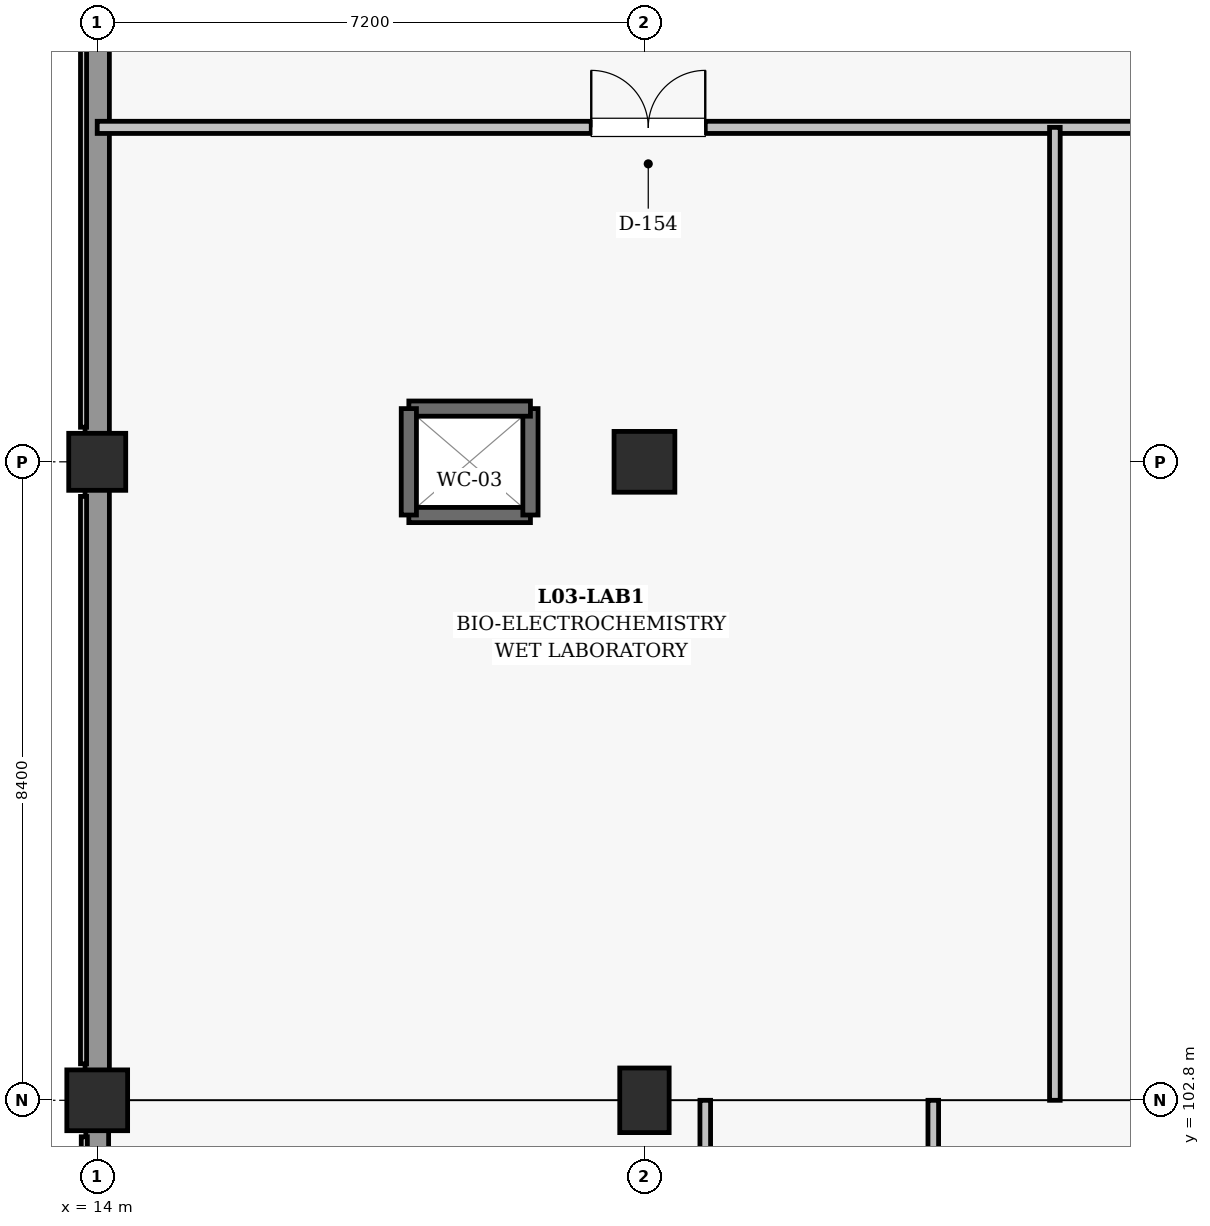
"""IFC4 building model, lengths in metres.
Left out: names, types, materials, properties, quantities, classifications, styles, units other than length and angle.
Written with IfcOpenShell. Run it as: python <this file> out.ifc"""

import sys

from ifc_helpers import new_model, si_unit, direction, frame, frame_2d, origin, origin_2d, place, context, subcontext, project, spatial, rectangle, extrude, element, fill, save


model = new_model("IFC4")
c1 = context("Model", 3, precision=1e-05, world=origin(), true_north=direction((0.0, 1.0)))
c2 = subcontext(c1, "Body", "Model", "MODEL_VIEW")
j1 = project(units=[si_unit("LENGTHUNIT", "METRE"), si_unit("PLANEANGLEUNIT", "RADIAN")], contexts=[c1])
p1 = place(None, origin())
s1 = spatial("IfcSite", under=j1, at=p1, CompositionType="ELEMENT")
p2 = place(p1, origin())
s2 = spatial("IfcBuilding", under=s1, at=p2, CompositionType="ELEMENT")
p3 = place(p2, frame((0.0, 0.0, 14.4)))
s3 = spatial("IfcBuildingStorey", under=s2, at=p3, CompositionType="ELEMENT", Elevation=14.4)
p4 = place(p3, frame((14.0, 102.8, 0.0), z_axis=(0.0, 0.0, 1.0), x_axis=(1.0, 0.0, 0.0)))
e1 = element("IfcColumn", 1, at=p4, inside=s3, PredefinedType="COLUMN", context=c2, shape_type="SweptSolid", body=[
    extrude(rectangle(XDim=0.8, YDim=0.8, at=origin_2d()), origin(), (0.0, 0.0, 1.0), 4.5),
])
p5 = place(p3, frame((14.0, 111.2, 0.0), z_axis=(0.0, 0.0, 1.0), x_axis=(1.0, 0.0, 0.0)))
e2 = element("IfcColumn", 2, at=p5, inside=s3, PredefinedType="COLUMN", context=c2, shape_type="SweptSolid", body=[
    extrude(rectangle(XDim=0.75, YDim=0.75, at=origin_2d()), origin(), (0.0, 0.0, 1.0), 4.5),
])
p6 = place(p3, frame((21.2, 102.8, 0.0), z_axis=(0.0, 0.0, 1.0), x_axis=(1.0, 0.0, 0.0)))
e3 = element("IfcColumn", 3, at=p6, inside=s3, PredefinedType="COLUMN", context=c2, shape_type="SweptSolid", body=[
    extrude(rectangle(XDim=0.65, YDim=0.85, at=origin_2d()), origin(), (0.0, 0.0, 1.0), 4.5),
])
p7 = place(p3, frame((21.2, 111.2, 0.0), z_axis=(0.0, 0.0, 1.0), x_axis=(1.0, 0.0, 0.0)))
e4 = element("IfcColumn", 4, at=p7, inside=s3, PredefinedType="COLUMN", context=c2, shape_type="SweptSolid", body=[
    extrude(rectangle(XDim=0.8, YDim=0.8, at=origin_2d()), origin(), (0.0, 0.0, 1.0), 4.5),
])
p8 = place(p3, frame((14.0, 103.18, 0.0), z_axis=(0.0, 0.0, 1.0), x_axis=(0.0, 1.0, 0.0)))
e5 = element("IfcWall", 5, at=p8, inside=s3, PredefinedType="SOLIDWALL", context=c2, shape_type="SweptSolid", body=[
    extrude(rectangle(XDim=7.665, YDim=0.32, at=frame_2d((3.833, 0.0))), origin(), (0.0, 0.0, 1.0), 3.355),
])
p9 = place(p3, frame((14.0, 111.555, 0.0), z_axis=(0.0, 0.0, 1.0), x_axis=(0.0, 1.0, 0.0)))
e6 = element("IfcWall", 6, at=p9, inside=s3, PredefinedType="SOLIDWALL", context=c2, shape_type="SweptSolid", body=[
    extrude(rectangle(XDim=7.69, YDim=0.32, at=frame_2d((3.845, 0.0))), origin(), (0.0, 0.0, 1.0), 3.405),
])
p10 = place(p3, frame((14.0, 94.73, 0.0), z_axis=(0.0, 0.0, 1.0), x_axis=(0.0, 1.0, 0.0)))
e7 = element("IfcWall", 7, at=p10, inside=s3, PredefinedType="SOLIDWALL", context=c2, shape_type="SweptSolid", body=[
    extrude(rectangle(XDim=7.69, YDim=0.3, at=frame_2d((3.845, 0.0))), origin(), (0.0, 0.0, 1.0), 3.355),
])
p11 = place(p3, frame((18.1, 110.5, 0.0), z_axis=(0.0, 0.0, 1.0), x_axis=(1.0, 0.0, 0.0)))
e8 = element("IfcWall", 8, at=p11, inside=s3, PredefinedType="SHEAR", context=c2, shape_type="SweptSolid", body=[
    extrude(rectangle(XDim=1.6, YDim=0.2, at=frame_2d((0.8, 0.0))), origin(), (0.0, 0.0, 1.0), 4.14),
])
p12 = place(p3, frame((19.7, 110.5, 0.0), z_axis=(0.0, 0.0, 1.0), x_axis=(0.0, 1.0, 0.0)))
e9 = element("IfcWall", 9, at=p12, inside=s3, PredefinedType="SHEAR", context=c2, shape_type="SweptSolid", body=[
    extrude(rectangle(XDim=1.4, YDim=0.2, at=frame_2d((0.7, 0.0))), origin(), (0.0, 0.0, 1.0), 4.14),
])
p13 = place(p3, frame((19.7, 111.9, 0.0), z_axis=(0.0, 0.0, 1.0), x_axis=(-1.0, 0.0, 0.0)))
e10 = element("IfcWall", 10, at=p13, inside=s3, PredefinedType="SHEAR", context=c2, shape_type="SweptSolid", body=[
    extrude(rectangle(XDim=1.6, YDim=0.2, at=frame_2d((0.8, 0.0))), origin(), (0.0, 0.0, 1.0), 4.14),
])
p14 = place(p3, frame((18.1, 111.9, 0.0), z_axis=(0.0, 0.0, 1.0), x_axis=(0.0, -1.0, 0.0)))
e11 = element("IfcWall", 11, at=p14, inside=s3, PredefinedType="SHEAR", context=c2, shape_type="SweptSolid", body=[
    extrude(rectangle(XDim=1.4, YDim=0.2, at=frame_2d((0.7, 0.0))), origin(), (0.0, 0.0, 1.0), 4.14),
])
p15 = place(p3, frame((14.0, 115.6, 0.0), z_axis=(0.0, 0.0, 1.0), x_axis=(1.0, 0.0, 0.0)))
e12 = element("IfcWall", 12, at=p15, inside=s3, PredefinedType="PARTITIONING", context=c2, shape_type="SweptSolid", body=[
    extrude(rectangle(XDim=100.8, YDim=0.16, at=frame_2d((50.4, 0.0))), origin(), (0.0, 0.0, 1.0), 2.96),
])
p16 = place(p15, frame((29.9, 0.0, 0.0)))
e13 = element("IfcOpeningElement", 13, at=p16, cuts=e12, PredefinedType="OPENING", context=c2, shape_type="SweptSolid", body=[
    extrude(rectangle(XDim=1.0, YDim=2.15, at=frame_2d((0.5, 1.075))), frame((0.0, 0.09, 0.0), z_axis=(0.0, -1.0, 0.0), x_axis=(1.0, 0.0, 0.0)), (0.0, 0.0, 1.0), 0.18),
])
p17 = place(p15, frame((6.5, 0.0, 0.0)))
e14 = element("IfcOpeningElement", 14, at=p17, cuts=e12, PredefinedType="OPENING", context=c2, shape_type="SweptSolid", body=[
    extrude(rectangle(XDim=1.5, YDim=2.25, at=frame_2d((0.75, 1.125))), frame((0.0, 0.09, 0.0), z_axis=(0.0, -1.0, 0.0), x_axis=(1.0, 0.0, 0.0)), (0.0, 0.0, 1.0), 0.18),
])
p18 = place(p15, frame((22.9, 0.0, 0.0)))
e15 = element("IfcOpeningElement", 15, at=p18, cuts=e12, PredefinedType="OPENING", context=c2, shape_type="SweptSolid", body=[
    extrude(rectangle(XDim=1.5, YDim=2.25, at=frame_2d((0.75, 1.125))), frame((0.0, 0.09, 0.0), z_axis=(0.0, -1.0, 0.0), x_axis=(1.0, 0.0, 0.0)), (0.0, 0.0, 1.0), 0.18),
])
p19 = place(p15, frame((39.4, 0.0, 0.0)))
e16 = element("IfcOpeningElement", 16, at=p19, cuts=e12, PredefinedType="OPENING", context=c2, shape_type="SweptSolid", body=[
    extrude(rectangle(XDim=1.5, YDim=2.25, at=frame_2d((0.75, 1.125))), frame((0.0, 0.09, 0.0), z_axis=(0.0, -1.0, 0.0), x_axis=(1.0, 0.0, 0.0)), (0.0, 0.0, 1.0), 0.18),
])
p20 = place(p15, frame((55.8, 0.0, 0.0)))
e17 = element("IfcOpeningElement", 17, at=p20, cuts=e12, PredefinedType="OPENING", context=c2, shape_type="SweptSolid", body=[
    extrude(rectangle(XDim=1.5, YDim=2.25, at=frame_2d((0.75, 1.125))), frame((0.0, 0.09, 0.0), z_axis=(0.0, -1.0, 0.0), x_axis=(1.0, 0.0, 0.0)), (0.0, 0.0, 1.0), 0.18),
])
p21 = place(p15, frame((74.9, 0.0, 0.0)))
e18 = element("IfcOpeningElement", 18, at=p21, cuts=e12, PredefinedType="OPENING", context=c2, shape_type="SweptSolid", body=[
    extrude(rectangle(XDim=1.5, YDim=2.25, at=frame_2d((0.75, 1.125))), frame((0.0, 0.09, 0.0), z_axis=(0.0, -1.0, 0.0), x_axis=(1.0, 0.0, 0.0)), (0.0, 0.0, 1.0), 0.18),
])
p22 = place(p15, frame((87.9, 0.0, 0.0)))
e19 = element("IfcOpeningElement", 19, at=p22, cuts=e12, PredefinedType="OPENING", context=c2, shape_type="SweptSolid", body=[
    extrude(rectangle(XDim=1.1, YDim=2.15, at=frame_2d((0.55, 1.075))), frame((0.0, 0.09, 0.0), z_axis=(0.0, -1.0, 0.0), x_axis=(1.0, 0.0, 0.0)), (0.0, 0.0, 1.0), 0.18),
])
p23 = place(p15, frame((91.45, 0.0, 0.0)))
e20 = element("IfcOpeningElement", 20, at=p23, cuts=e12, PredefinedType="OPENING", context=c2, shape_type="SweptSolid", body=[
    extrude(rectangle(XDim=1.18, YDim=2.2, at=frame_2d((0.59, 1.1))), frame((0.0, 0.09, 0.0), z_axis=(0.0, -1.0, 0.0), x_axis=(1.0, 0.0, 0.0)), (0.0, 0.0, 1.0), 0.18),
])
p24 = place(p3, frame((26.6, 102.8, 0.0), z_axis=(0.0, 0.0, 1.0), x_axis=(0.0, 1.0, 0.0)))
e21 = element("IfcWall", 21, at=p24, inside=s3, PredefinedType="PARTITIONING", context=c2, shape_type="SweptSolid", body=[
    extrude(rectangle(XDim=12.8, YDim=0.14, at=frame_2d((6.4, 0.0))), origin(), (0.0, 0.0, 1.0), 3.51),
])
p25 = place(p3, frame((25.0, 36.0, 0.0), z_axis=(0.0, 0.0, 1.0), x_axis=(0.0, 1.0, 0.0)))
e22 = element("IfcWall", 22, at=p25, inside=s3, PredefinedType="PARTITIONING", context=c2, shape_type="SweptSolid", body=[
    extrude(rectangle(XDim=66.8, YDim=0.14, at=frame_2d((33.4, 0.0))), origin(), (0.0, 0.0, 1.0), 3.38),
])
p26 = place(p25, frame((9.0, 0.0, 0.0)))
e23 = element("IfcOpeningElement", 23, at=p26, cuts=e22, PredefinedType="OPENING", context=c2, shape_type="SweptSolid", body=[
    extrude(rectangle(XDim=1.18, YDim=2.2, at=frame_2d((0.59, 1.1))), frame((0.0, 0.08, 0.0), z_axis=(0.0, -1.0, 0.0), x_axis=(1.0, 0.0, 0.0)), (0.0, 0.0, 1.0), 0.16),
])
p27 = place(p25, frame((30.4, 0.0, 0.0)))
e24 = element("IfcOpeningElement", 24, at=p27, cuts=e22, PredefinedType="OPENING", context=c2, shape_type="SweptSolid", body=[
    extrude(rectangle(XDim=1.25, YDim=2.2, at=frame_2d((0.625, 1.1))), frame((0.0, 0.08, 0.0), z_axis=(0.0, -1.0, 0.0), x_axis=(1.0, 0.0, 0.0)), (0.0, 0.0, 1.0), 0.16),
])
p28 = place(p25, frame((54.6, 0.0, 0.0)))
e25 = element("IfcOpeningElement", 25, at=p28, cuts=e22, PredefinedType="OPENING", context=c2, shape_type="SweptSolid", body=[
    extrude(rectangle(XDim=1.35, YDim=2.2, at=frame_2d((0.675, 1.1))), frame((0.0, 0.08, 0.0), z_axis=(0.0, -1.0, 0.0), x_axis=(1.0, 0.0, 0.0)), (0.0, 0.0, 1.0), 0.16),
])
p29 = place(p3, frame((22.0, 63.2, 0.0), z_axis=(0.0, 0.0, 1.0), x_axis=(0.0, 1.0, 0.0)))
e26 = element("IfcWall", 26, at=p29, inside=s3, PredefinedType="PARTITIONING", context=c2, shape_type="SweptSolid", body=[
    extrude(rectangle(XDim=39.6, YDim=0.14, at=frame_2d((19.8, 0.0))), origin(), (0.0, 0.0, 1.0), 3.38),
])
p30 = place(p29, frame((11.3, 0.0, 0.0)))
e27 = element("IfcOpeningElement", 27, at=p30, cuts=e26, PredefinedType="OPENING", context=c2, shape_type="SweptSolid", body=[
    extrude(rectangle(XDim=1.25, YDim=2.2, at=frame_2d((0.625, 1.1))), frame((0.0, 0.08, 0.0), z_axis=(0.0, -1.0, 0.0), x_axis=(1.0, 0.0, 0.0)), (0.0, 0.0, 1.0), 0.16),
])
p31 = place(p29, frame((26.3, 0.0, 0.0)))
e28 = element("IfcOpeningElement", 28, at=p31, cuts=e26, PredefinedType="OPENING", context=c2, shape_type="SweptSolid", body=[
    extrude(rectangle(XDim=1.35, YDim=2.2, at=frame_2d((0.675, 1.1))), frame((0.0, 0.08, 0.0), z_axis=(0.0, -1.0, 0.0), x_axis=(1.0, 0.0, 0.0)), (0.0, 0.0, 1.0), 0.16),
])
p32 = place(p17, origin())
e29 = element("IfcDoor", 29, at=p32, inside=s3, OperationType="DOUBLE_DOOR_SINGLE_SWING", PredefinedType="DOOR", context=c2, shape_type="SweptSolid", body=[
    extrude(rectangle(XDim=1.5, YDim=2.25, at=frame_2d((0.75, 1.125))), frame((0.0, 0.025, 0.0), z_axis=(0.0, -1.0, 0.0), x_axis=(1.0, 0.0, 0.0)), (0.0, 0.0, 1.0), 0.05),
])
fill(e14, e29)
save(model, sys.argv[1])
